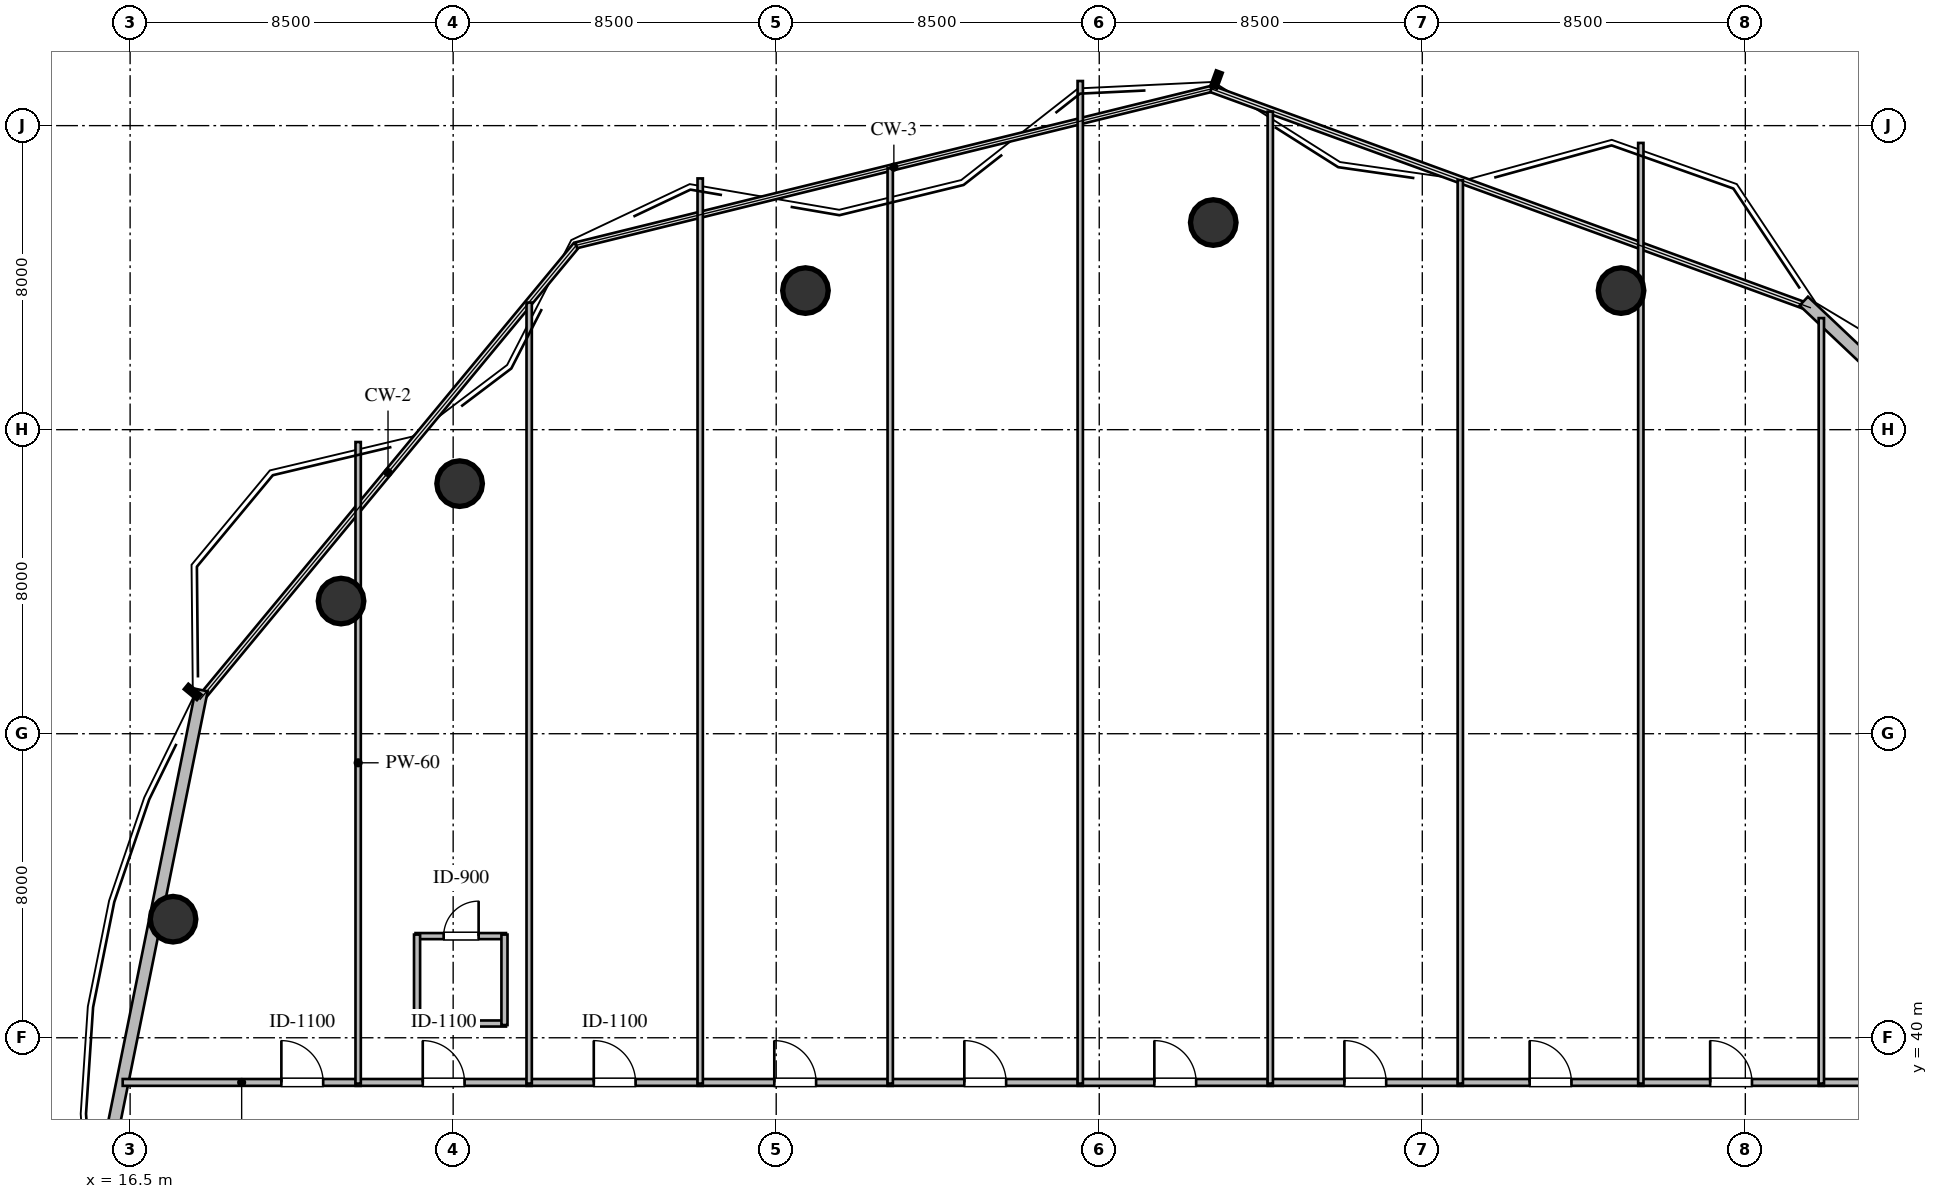
"""IFC4 building model, lengths in metres.
Left out: names, types, materials, properties, quantities, classifications, styles, units other than length and angle.
Written with IfcOpenShell. Run it as: python <this file> out.ifc"""

import sys

from ifc_helpers import new_model, si_unit, direction, frame, frame_2d, origin, origin_2d, place, context, subcontext, project, spatial, rectangle, circle, extrude, element, fill, save


model = new_model("IFC4")
c1 = context("Model", 3, precision=1e-05, world=origin(), true_north=direction((0.0, 1.0)))
c2 = subcontext(c1, "Body", "Model", "MODEL_VIEW")
j1 = project(units=[si_unit("LENGTHUNIT", "METRE"), si_unit("PLANEANGLEUNIT", "RADIAN")], contexts=[c1])
p1 = place(None, origin())
s1 = spatial("IfcSite", under=j1, at=p1, CompositionType="ELEMENT")
p2 = place(p1, origin())
s2 = spatial("IfcBuilding", under=s1, at=p2, CompositionType="ELEMENT")
p3 = place(p2, frame((0.0, 0.0, 135.0)))
s3 = spatial("IfcBuildingStorey", under=s2, at=p3, CompositionType="ELEMENT", Elevation=135.0)
for number, where, z_axis, x_axis in (
    (1, (55.73, 59.66, 0.0), (0.0, 0.0, 1.0), (1.0, 0.0, 0.0)),
    (2, (45.0, 61.45, 0.0), (0.0, 0.0, 1.0), (1.0, 0.0, 0.0)),
    (3, (34.27, 59.66, 0.0), (0.0, 0.0, 1.0), (1.0, 0.0, 0.0)),
    (4, (25.17, 54.58, 0.0), (0.0, 0.0, 1.0), (1.0, 0.0, 0.0)),
    (5, (22.05, 51.49, 0.0), (0.0, 0.0, 1.0), (1.0, 0.0, 0.0)),
    (6, (17.63, 43.12, 0.0), (0.0, 0.0, 1.0), (1.0, 0.0, 0.0)),
):
    element("IfcColumn", number, at=place(p3, frame(where, z_axis=z_axis, x_axis=x_axis)), inside=s3, PredefinedType="COLUMN", context=c2, shape_type="SweptSolid", body=[
        extrude(circle(Radius=0.6, at=origin_2d()), origin(), (0.0, 0.0, 1.0), 3.6),
    ])
p4 = place(p3, frame((15.514, 34.967, 0.0), z_axis=(0.0, 0.0, 1.0), x_axis=(0.198370893133, 0.980127026848, 0.0)))
e7 = element("IfcWall", 7, at=p4, inside=s3, PredefinedType="STANDARD", context=c2, shape_type="SweptSolid", body=[
    extrude(rectangle(XDim=14.469, YDim=0.32, at=frame_2d((7.234, 0.0))), origin(), (0.0, 0.0, 1.0), 3.36),
])
p5 = place(p3, frame((60.538, 59.383, 0.0), z_axis=(0.0, 0.0, 1.0), x_axis=(0.726378346584, -0.687295058628, 0.0)))
e8 = element("IfcWall", 8, at=p5, inside=s3, PredefinedType="STANDARD", context=c2, shape_type="SweptSolid", body=[
    extrude(rectangle(XDim=15.654, YDim=0.32, at=frame_2d((7.827, 0.0))), origin(), (0.0, 0.0, 1.0), 3.36),
])
p6 = place(p3, frame((24.01, 40.375, 0.0), z_axis=(0.0, 0.0, 1.0), x_axis=(1.0, 0.0, 0.0)))
e9 = element("IfcWall", 9, at=p6, inside=s3, PredefinedType="PLUMBINGWALL", context=c2, shape_type="SweptSolid", body=[
    extrude(rectangle(XDim=2.38, YDim=0.16, at=frame_2d((1.19, 0.0))), origin(), (0.0, 0.0, 1.0), 3.36),
])
p7 = place(p3, frame((24.01, 42.675, 0.0), z_axis=(0.0, 0.0, 1.0), x_axis=(1.0, 0.0, 0.0)))
e10 = element("IfcWall", 10, at=p7, inside=s3, PredefinedType="PLUMBINGWALL", context=c2, shape_type="SweptSolid", body=[
    extrude(rectangle(XDim=2.38, YDim=0.16, at=frame_2d((1.19, 0.0))), origin(), (0.0, 0.0, 1.0), 3.36),
])
p8 = place(p7, frame((0.74, 0.0, 0.0)))
e11 = element("IfcOpeningElement", 11, at=p8, cuts=e10, PredefinedType="OPENING", context=c2, shape_type="SweptSolid", body=[
    extrude(rectangle(XDim=0.92, YDim=2.1, at=frame_2d((0.46, 1.05))), frame((0.0, 0.09, 0.0), z_axis=(0.0, -1.0, 0.0), x_axis=(1.0, 0.0, 0.0)), (0.0, 0.0, 1.0), 0.18),
])
for number, where, z_axis, x_axis in (
    (12, (24.05, 40.335, 0.0), (0.0, 0.0, 1.0), (0.0, 1.0, 0.0)),
    (13, (26.35, 40.335, 0.0), (0.0, 0.0, 1.0), (0.0, 1.0, 0.0)),
):
    element("IfcWall", number, at=place(p3, frame(where, z_axis=z_axis, x_axis=x_axis)), inside=s3, PredefinedType="PLUMBINGWALL", context=c2, shape_type="SweptSolid", body=[
        extrude(rectangle(XDim=2.38, YDim=0.16, at=frame_2d((1.19, 0.0))), origin(), (0.0, 0.0, 1.0), 3.36),
    ])
p9 = place(p3, frame((16.305, 38.825, 0.0), z_axis=(0.0, 0.0, 1.0), x_axis=(1.0, 0.0, 0.0)))
e14 = element("IfcWall", 14, at=p9, inside=s3, PredefinedType="PARTITIONING", context=c2, shape_type="SweptSolid", body=[
    extrude(rectangle(XDim=6.26, YDim=0.18, at=frame_2d((3.13, 0.0))), origin(), (0.0, 0.0, 1.0), 3.36),
])
p10 = place(p9, frame((4.175, 0.0, 0.0)))
e15 = element("IfcOpeningElement", 15, at=p10, cuts=e14, PredefinedType="OPENING", context=c2, shape_type="SweptSolid", body=[
    extrude(rectangle(XDim=1.1, YDim=2.1, at=frame_2d((0.55, 1.05))), frame((0.0, 0.1, 0.0), z_axis=(0.0, -1.0, 0.0), x_axis=(1.0, 0.0, 0.0)), (0.0, 0.0, 1.0), 0.2),
])
p11 = place(p3, frame((22.435, 38.825, 0.0), z_axis=(0.0, 0.0, 1.0), x_axis=(1.0, 0.0, 0.0)))
e16 = element("IfcWall", 16, at=p11, inside=s3, PredefinedType="PARTITIONING", context=c2, shape_type="SweptSolid", body=[
    extrude(rectangle(XDim=4.63, YDim=0.18, at=frame_2d((2.315, 0.0))), origin(), (0.0, 0.0, 1.0), 3.36),
])
p12 = place(p11, frame((1.765, 0.0, 0.0)))
e17 = element("IfcOpeningElement", 17, at=p12, cuts=e16, PredefinedType="OPENING", context=c2, shape_type="SweptSolid", body=[
    extrude(rectangle(XDim=1.1, YDim=2.1, at=frame_2d((0.55, 1.05))), frame((0.0, 0.1, 0.0), z_axis=(0.0, -1.0, 0.0), x_axis=(1.0, 0.0, 0.0)), (0.0, 0.0, 1.0), 0.2),
])
p13 = place(p3, frame((26.935, 38.825, 0.0), z_axis=(0.0, 0.0, 1.0), x_axis=(1.0, 0.0, 0.0)))
e18 = element("IfcWall", 18, at=p13, inside=s3, PredefinedType="PARTITIONING", context=c2, shape_type="SweptSolid", body=[
    extrude(rectangle(XDim=4.63, YDim=0.18, at=frame_2d((2.315, 0.0))), origin(), (0.0, 0.0, 1.0), 3.36),
])
p14 = place(p13, frame((1.765, 0.0, 0.0)))
e19 = element("IfcOpeningElement", 19, at=p14, cuts=e18, PredefinedType="OPENING", context=c2, shape_type="SweptSolid", body=[
    extrude(rectangle(XDim=1.1, YDim=2.1, at=frame_2d((0.55, 1.05))), frame((0.0, 0.1, 0.0), z_axis=(0.0, -1.0, 0.0), x_axis=(1.0, 0.0, 0.0)), (0.0, 0.0, 1.0), 0.2),
])
p15 = place(p3, frame((31.435, 38.825, 0.0), z_axis=(0.0, 0.0, 1.0), x_axis=(1.0, 0.0, 0.0)))
e20 = element("IfcWall", 20, at=p15, inside=s3, PredefinedType="PARTITIONING", context=c2, shape_type="SweptSolid", body=[
    extrude(rectangle(XDim=5.13, YDim=0.18, at=frame_2d((2.565, 0.0))), origin(), (0.0, 0.0, 1.0), 3.36),
])
p16 = place(p15, frame((2.015, 0.0, 0.0)))
e21 = element("IfcOpeningElement", 21, at=p16, cuts=e20, PredefinedType="OPENING", context=c2, shape_type="SweptSolid", body=[
    extrude(rectangle(XDim=1.1, YDim=2.1, at=frame_2d((0.55, 1.05))), frame((0.0, 0.1, 0.0), z_axis=(0.0, -1.0, 0.0), x_axis=(1.0, 0.0, 0.0)), (0.0, 0.0, 1.0), 0.2),
])
p17 = place(p3, frame((36.435, 38.825, 0.0), z_axis=(0.0, 0.0, 1.0), x_axis=(1.0, 0.0, 0.0)))
e22 = element("IfcWall", 22, at=p17, inside=s3, PredefinedType="PARTITIONING", context=c2, shape_type="SweptSolid", body=[
    extrude(rectangle(XDim=5.13, YDim=0.18, at=frame_2d((2.565, 0.0))), origin(), (0.0, 0.0, 1.0), 3.36),
])
p18 = place(p17, frame((2.015, 0.0, 0.0)))
e23 = element("IfcOpeningElement", 23, at=p18, cuts=e22, PredefinedType="OPENING", context=c2, shape_type="SweptSolid", body=[
    extrude(rectangle(XDim=1.1, YDim=2.1, at=frame_2d((0.55, 1.05))), frame((0.0, 0.1, 0.0), z_axis=(0.0, -1.0, 0.0), x_axis=(1.0, 0.0, 0.0)), (0.0, 0.0, 1.0), 0.2),
])
p19 = place(p3, frame((41.435, 38.825, 0.0), z_axis=(0.0, 0.0, 1.0), x_axis=(1.0, 0.0, 0.0)))
e24 = element("IfcWall", 24, at=p19, inside=s3, PredefinedType="PARTITIONING", context=c2, shape_type="SweptSolid", body=[
    extrude(rectangle(XDim=5.13, YDim=0.18, at=frame_2d((2.565, 0.0))), origin(), (0.0, 0.0, 1.0), 3.36),
])
p20 = place(p19, frame((2.015, 0.0, 0.0)))
e25 = element("IfcOpeningElement", 25, at=p20, cuts=e24, PredefinedType="OPENING", context=c2, shape_type="SweptSolid", body=[
    extrude(rectangle(XDim=1.1, YDim=2.1, at=frame_2d((0.55, 1.05))), frame((0.0, 0.1, 0.0), z_axis=(0.0, -1.0, 0.0), x_axis=(1.0, 0.0, 0.0)), (0.0, 0.0, 1.0), 0.2),
])
p21 = place(p3, frame((46.435, 38.825, 0.0), z_axis=(0.0, 0.0, 1.0), x_axis=(1.0, 0.0, 0.0)))
e26 = element("IfcWall", 26, at=p21, inside=s3, PredefinedType="PARTITIONING", context=c2, shape_type="SweptSolid", body=[
    extrude(rectangle(XDim=5.13, YDim=0.18, at=frame_2d((2.565, 0.0))), origin(), (0.0, 0.0, 1.0), 3.36),
])
p22 = place(p21, frame((2.015, 0.0, 0.0)))
e27 = element("IfcOpeningElement", 27, at=p22, cuts=e26, PredefinedType="OPENING", context=c2, shape_type="SweptSolid", body=[
    extrude(rectangle(XDim=1.1, YDim=2.1, at=frame_2d((0.55, 1.05))), frame((0.0, 0.1, 0.0), z_axis=(0.0, -1.0, 0.0), x_axis=(1.0, 0.0, 0.0)), (0.0, 0.0, 1.0), 0.2),
])
p23 = place(p3, frame((51.435, 38.825, 0.0), z_axis=(0.0, 0.0, 1.0), x_axis=(1.0, 0.0, 0.0)))
e28 = element("IfcWall", 28, at=p23, inside=s3, PredefinedType="PARTITIONING", context=c2, shape_type="SweptSolid", body=[
    extrude(rectangle(XDim=4.88, YDim=0.18, at=frame_2d((2.44, 0.0))), origin(), (0.0, 0.0, 1.0), 3.36),
])
p24 = place(p23, frame((1.89, 0.0, 0.0)))
e29 = element("IfcOpeningElement", 29, at=p24, cuts=e28, PredefinedType="OPENING", context=c2, shape_type="SweptSolid", body=[
    extrude(rectangle(XDim=1.1, YDim=2.1, at=frame_2d((0.55, 1.05))), frame((0.0, 0.1, 0.0), z_axis=(0.0, -1.0, 0.0), x_axis=(1.0, 0.0, 0.0)), (0.0, 0.0, 1.0), 0.2),
])
p25 = place(p3, frame((56.185, 38.825, 0.0), z_axis=(0.0, 0.0, 1.0), x_axis=(1.0, 0.0, 0.0)))
e30 = element("IfcWall", 30, at=p25, inside=s3, PredefinedType="PARTITIONING", context=c2, shape_type="SweptSolid", body=[
    extrude(rectangle(XDim=4.88, YDim=0.18, at=frame_2d((2.44, 0.0))), origin(), (0.0, 0.0, 1.0), 3.36),
])
p26 = place(p25, frame((1.89, 0.0, 0.0)))
e31 = element("IfcOpeningElement", 31, at=p26, cuts=e30, PredefinedType="OPENING", context=c2, shape_type="SweptSolid", body=[
    extrude(rectangle(XDim=1.1, YDim=2.1, at=frame_2d((0.55, 1.05))), frame((0.0, 0.1, 0.0), z_axis=(0.0, -1.0, 0.0), x_axis=(1.0, 0.0, 0.0)), (0.0, 0.0, 1.0), 0.2),
])
p27 = place(p3, frame((60.935, 38.825, 0.0), z_axis=(0.0, 0.0, 1.0), x_axis=(1.0, 0.0, 0.0)))
e32 = element("IfcWall", 32, at=p27, inside=s3, PredefinedType="PARTITIONING", context=c2, shape_type="SweptSolid", body=[
    extrude(rectangle(XDim=7.595, YDim=0.18, at=frame_2d((3.797, 0.0))), origin(), (0.0, 0.0, 1.0), 3.36),
])
p28 = place(p27, frame((3.247, 0.0, 0.0)))
e33 = element("IfcOpeningElement", 33, at=p28, cuts=e32, PredefinedType="OPENING", context=c2, shape_type="SweptSolid", body=[
    extrude(rectangle(XDim=1.1, YDim=2.1, at=frame_2d((0.55, 1.05))), frame((0.0, 0.1, 0.0), z_axis=(0.0, -1.0, 0.0), x_axis=(1.0, 0.0, 0.0)), (0.0, 0.0, 1.0), 0.2),
])
p29 = place(p3, frame((22.5, 55.675, 0.0), z_axis=(0.0, 0.0, 1.0), x_axis=(0.0, -1.0, 0.0)))
e34 = element("IfcWall", 34, at=p29, inside=s3, PredefinedType="PARTITIONING", context=c2, shape_type="SweptSolid", body=[
    extrude(rectangle(XDim=16.88, YDim=0.14, at=frame_2d((8.44, 0.0))), origin(), (0.0, 0.0, 1.0), 2.89),
])
p30 = place(p3, frame((27.0, 59.345, 0.0), z_axis=(0.0, 0.0, 1.0), x_axis=(0.0, -1.0, 0.0)))
e35 = element("IfcWall", 35, at=p30, inside=s3, PredefinedType="PARTITIONING", context=c2, shape_type="SweptSolid", body=[
    extrude(rectangle(XDim=20.55, YDim=0.14, at=frame_2d((10.275, 0.0))), origin(), (0.0, 0.0, 1.0), 3.36),
])
p31 = place(p3, frame((31.5, 62.611, 0.0), z_axis=(0.0, 0.0, 1.0), x_axis=(0.0, -1.0, 0.0)))
e36 = element("IfcWall", 36, at=p31, inside=s3, PredefinedType="PARTITIONING", context=c2, shape_type="SweptSolid", body=[
    extrude(rectangle(XDim=23.816, YDim=0.14, at=frame_2d((11.908, 0.0))), origin(), (0.0, 0.0, 1.0), 3.36),
])
p32 = place(p3, frame((36.5, 62.876, 0.0), z_axis=(0.0, 0.0, 1.0), x_axis=(0.0, -1.0, 0.0)))
e37 = element("IfcWall", 37, at=p32, inside=s3, PredefinedType="PARTITIONING", context=c2, shape_type="SweptSolid", body=[
    extrude(rectangle(XDim=24.081, YDim=0.14, at=frame_2d((12.041, 0.0))), origin(), (0.0, 0.0, 1.0), 3.36),
])
p33 = place(p3, frame((41.5, 65.174, 0.0), z_axis=(0.0, 0.0, 1.0), x_axis=(0.0, -1.0, 0.0)))
e38 = element("IfcWall", 38, at=p33, inside=s3, PredefinedType="PARTITIONING", context=c2, shape_type="SweptSolid", body=[
    extrude(rectangle(XDim=26.379, YDim=0.14, at=frame_2d((13.189, 0.0))), origin(), (0.0, 0.0, 1.0), 3.36),
])
p34 = place(p3, frame((46.5, 64.369, 0.0), z_axis=(0.0, 0.0, 1.0), x_axis=(0.0, -1.0, 0.0)))
e39 = element("IfcWall", 39, at=p34, inside=s3, PredefinedType="PARTITIONING", context=c2, shape_type="SweptSolid", body=[
    extrude(rectangle(XDim=25.574, YDim=0.14, at=frame_2d((12.787, 0.0))), origin(), (0.0, 0.0, 1.0), 3.36),
])
p35 = place(p3, frame((51.5, 62.565, 0.0), z_axis=(0.0, 0.0, 1.0), x_axis=(0.0, -1.0, 0.0)))
e40 = element("IfcWall", 40, at=p35, inside=s3, PredefinedType="PARTITIONING", context=c2, shape_type="SweptSolid", body=[
    extrude(rectangle(XDim=23.77, YDim=0.14, at=frame_2d((11.885, 0.0))), origin(), (0.0, 0.0, 1.0), 3.36),
])
p36 = place(p3, frame((56.25, 63.545, 0.0), z_axis=(0.0, 0.0, 1.0), x_axis=(0.0, -1.0, 0.0)))
e41 = element("IfcWall", 41, at=p36, inside=s3, PredefinedType="PARTITIONING", context=c2, shape_type="SweptSolid", body=[
    extrude(rectangle(XDim=24.75, YDim=0.14, at=frame_2d((12.375, 0.0))), origin(), (0.0, 0.0, 1.0), 3.36),
])
p37 = place(p3, frame((61.0, 58.936, 0.0), z_axis=(0.0, 0.0, 1.0), x_axis=(0.0, -1.0, 0.0)))
e42 = element("IfcWall", 42, at=p37, inside=s3, PredefinedType="PARTITIONING", context=c2, shape_type="SweptSolid", body=[
    extrude(rectangle(XDim=20.141, YDim=0.14, at=frame_2d((10.07, 0.0))), origin(), (0.0, 0.0, 1.0), 3.36),
])
p38 = place(p8, origin())
e43 = element("IfcDoor", 43, at=p38, inside=s3, OperationType="SINGLE_SWING_RIGHT", PredefinedType="DOOR", context=c2, shape_type="SweptSolid", body=[
    extrude(rectangle(XDim=0.92, YDim=2.1, at=frame_2d((0.46, 1.05))), frame((0.0, 0.025, 0.0), z_axis=(0.0, -1.0, 0.0), x_axis=(1.0, 0.0, 0.0)), (0.0, 0.0, 1.0), 0.05),
])
fill(e11, e43)
p39 = place(p10, origin())
e44 = element("IfcDoor", 44, at=p39, inside=s3, OperationType="SINGLE_SWING_LEFT", PredefinedType="DOOR", context=c2, shape_type="SweptSolid", body=[
    extrude(rectangle(XDim=1.1, YDim=2.1, at=frame_2d((0.55, 1.05))), frame((0.0, 0.025, 0.0), z_axis=(0.0, -1.0, 0.0), x_axis=(1.0, 0.0, 0.0)), (0.0, 0.0, 1.0), 0.05),
])
fill(e15, e44)
p40 = place(p12, origin())
e45 = element("IfcDoor", 45, at=p40, inside=s3, OperationType="SINGLE_SWING_LEFT", PredefinedType="DOOR", context=c2, shape_type="SweptSolid", body=[
    extrude(rectangle(XDim=1.1, YDim=2.1, at=frame_2d((0.55, 1.05))), frame((0.0, 0.025, 0.0), z_axis=(0.0, -1.0, 0.0), x_axis=(1.0, 0.0, 0.0)), (0.0, 0.0, 1.0), 0.05),
])
fill(e17, e45)
p41 = place(p14, origin())
e46 = element("IfcDoor", 46, at=p41, inside=s3, OperationType="SINGLE_SWING_LEFT", PredefinedType="DOOR", context=c2, shape_type="SweptSolid", body=[
    extrude(rectangle(XDim=1.1, YDim=2.1, at=frame_2d((0.55, 1.05))), frame((0.0, 0.025, 0.0), z_axis=(0.0, -1.0, 0.0), x_axis=(1.0, 0.0, 0.0)), (0.0, 0.0, 1.0), 0.05),
])
fill(e19, e46)
p42 = place(p16, origin())
e47 = element("IfcDoor", 47, at=p42, inside=s3, OperationType="SINGLE_SWING_LEFT", PredefinedType="DOOR", context=c2, shape_type="SweptSolid", body=[
    extrude(rectangle(XDim=1.1, YDim=2.1, at=frame_2d((0.55, 1.05))), frame((0.0, 0.025, 0.0), z_axis=(0.0, -1.0, 0.0), x_axis=(1.0, 0.0, 0.0)), (0.0, 0.0, 1.0), 0.05),
])
fill(e21, e47)
p43 = place(p18, origin())
e48 = element("IfcDoor", 48, at=p43, inside=s3, OperationType="SINGLE_SWING_LEFT", PredefinedType="DOOR", context=c2, shape_type="SweptSolid", body=[
    extrude(rectangle(XDim=1.1, YDim=2.1, at=frame_2d((0.55, 1.05))), frame((0.0, 0.025, 0.0), z_axis=(0.0, -1.0, 0.0), x_axis=(1.0, 0.0, 0.0)), (0.0, 0.0, 1.0), 0.05),
])
fill(e23, e48)
p44 = place(p20, origin())
e49 = element("IfcDoor", 49, at=p44, inside=s3, OperationType="SINGLE_SWING_LEFT", PredefinedType="DOOR", context=c2, shape_type="SweptSolid", body=[
    extrude(rectangle(XDim=1.1, YDim=2.1, at=frame_2d((0.55, 1.05))), frame((0.0, 0.025, 0.0), z_axis=(0.0, -1.0, 0.0), x_axis=(1.0, 0.0, 0.0)), (0.0, 0.0, 1.0), 0.05),
])
fill(e25, e49)
p45 = place(p22, origin())
e50 = element("IfcDoor", 50, at=p45, inside=s3, OperationType="SINGLE_SWING_LEFT", PredefinedType="DOOR", context=c2, shape_type="SweptSolid", body=[
    extrude(rectangle(XDim=1.1, YDim=2.1, at=frame_2d((0.55, 1.05))), frame((0.0, 0.025, 0.0), z_axis=(0.0, -1.0, 0.0), x_axis=(1.0, 0.0, 0.0)), (0.0, 0.0, 1.0), 0.05),
])
fill(e27, e50)
p46 = place(p24, origin())
e51 = element("IfcDoor", 51, at=p46, inside=s3, OperationType="SINGLE_SWING_LEFT", PredefinedType="DOOR", context=c2, shape_type="SweptSolid", body=[
    extrude(rectangle(XDim=1.1, YDim=2.1, at=frame_2d((0.55, 1.05))), frame((0.0, 0.025, 0.0), z_axis=(0.0, -1.0, 0.0), x_axis=(1.0, 0.0, 0.0)), (0.0, 0.0, 1.0), 0.05),
])
fill(e29, e51)
p47 = place(p26, origin())
e52 = element("IfcDoor", 52, at=p47, inside=s3, OperationType="SINGLE_SWING_LEFT", PredefinedType="DOOR", context=c2, shape_type="SweptSolid", body=[
    extrude(rectangle(XDim=1.1, YDim=2.1, at=frame_2d((0.55, 1.05))), frame((0.0, 0.025, 0.0), z_axis=(0.0, -1.0, 0.0), x_axis=(1.0, 0.0, 0.0)), (0.0, 0.0, 1.0), 0.05),
])
fill(e31, e52)
save(model, sys.argv[1])
